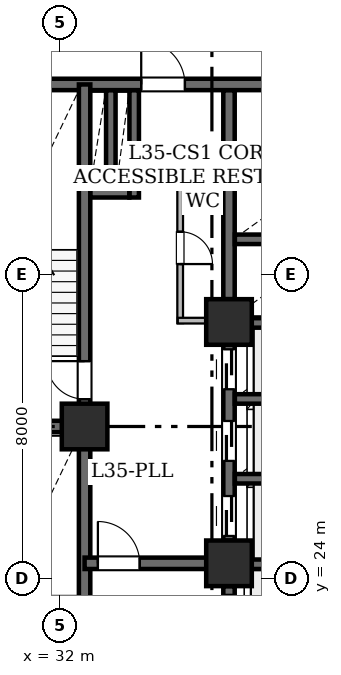
"""IFC4 building model, lengths in metres.
Left out: names, types, materials, properties, quantities, classifications, styles, units other than length and angle.
Written with IfcOpenShell. Run it as: python <this file> out.ifc"""

import sys

from ifc_helpers import new_model, si_unit, direction, frame, frame_2d, origin, origin_2d, place, context, subcontext, project, spatial, rectangle, hollow_rectangle, extrude, element, fill, save


model = new_model("IFC4")
c1 = context("Model", 3, precision=1e-05, world=origin(), true_north=direction((0.0, 1.0)))
c2 = subcontext(c1, "Body", "Model", "MODEL_VIEW")
j1 = project(units=[si_unit("LENGTHUNIT", "METRE"), si_unit("PLANEANGLEUNIT", "RADIAN")], contexts=[c1])
p1 = place(None, origin())
s1 = spatial("IfcSite", under=j1, at=p1, CompositionType="ELEMENT")
p2 = place(p1, origin())
s2 = spatial("IfcBuilding", under=s1, at=p2, CompositionType="ELEMENT")
p3 = place(p2, frame((0.0, 0.0, 138.4)))
s3 = spatial("IfcBuildingStorey", under=s2, at=p3, CompositionType="ELEMENT", Elevation=138.4)
for number, where, z_axis, x_axis in (
    (1, (32.65, 28.0, 0.0), (0.0, 0.0, 1.0), (1.0, 0.0, 0.0)),
    (2, (36.45, 24.4, 0.0), (0.0, 0.0, 1.0), (1.0, 0.0, 0.0)),
    (3, (36.45, 30.75, 0.0), (0.0, 0.0, 1.0), (1.0, 0.0, 0.0)),
):
    element("IfcColumn", number, at=place(p3, frame(where, z_axis=z_axis, x_axis=x_axis)), inside=s3, PredefinedType="COLUMN", context=c2, shape_type="SweptSolid", body=[
        extrude(hollow_rectangle(XDim=1.2, YDim=1.2, WallThickness=0.06, at=origin_2d()), origin(), (0.0, 0.0, 1.0), 3.65),
    ])
p4 = place(p3, frame((29.0, 37.0, 0.0), z_axis=(0.0, 0.0, 1.0), x_axis=(1.0, 0.0, 0.0)))
e4 = element("IfcWall", 4, at=p4, inside=s3, PredefinedType="SHEAR", context=c2, shape_type="SweptSolid", body=[
    extrude(rectangle(XDim=10.4, YDim=0.3, at=frame_2d((5.2, 0.0))), origin(), (0.0, 0.0, 1.0), 3.43),
])
p5 = place(p4, frame((5.14, 0.0, 0.0)))
e5 = element("IfcOpeningElement", 5, at=p5, cuts=e4, PredefinedType="OPENING", context=c2, shape_type="SweptSolid", body=[
    extrude(rectangle(XDim=1.15, YDim=2.2, at=frame_2d((0.575, 1.1))), frame((0.0, 0.16, 0.0), z_axis=(0.0, -1.0, 0.0), x_axis=(1.0, 0.0, 0.0)), (0.0, 0.0, 1.0), 0.32),
])
p6 = place(p3, frame((32.65, 19.0, 0.0), z_axis=(0.0, 0.0, 1.0), x_axis=(0.0, 1.0, 0.0)))
e6 = element("IfcWall", 6, at=p6, inside=s3, PredefinedType="SHEAR", context=c2, shape_type="SweptSolid", body=[
    extrude(rectangle(XDim=9.0, YDim=0.3, at=frame_2d((4.5, 0.0))), origin(), (0.0, 0.0, 1.0), 3.43),
])
p7 = place(p6, frame((0.72, 0.0, 0.0)))
e7 = element("IfcOpeningElement", 7, at=p7, cuts=e6, PredefinedType="OPENING", context=c2, shape_type="SweptSolid", body=[
    extrude(rectangle(XDim=1.0, YDim=2.15, at=frame_2d((0.5, 1.075))), frame((0.0, 0.16, 0.0), z_axis=(0.0, -1.0, 0.0), x_axis=(1.0, 0.0, 0.0)), (0.0, 0.0, 1.0), 0.32),
])
p8 = place(p3, frame((32.65, 28.0, 0.0), z_axis=(0.0, 0.0, 1.0), x_axis=(0.0, 1.0, 0.0)))
e8 = element("IfcWall", 8, at=p8, inside=s3, PredefinedType="SHEAR", context=c2, shape_type="SweptSolid", body=[
    extrude(rectangle(XDim=9.0, YDim=0.3, at=frame_2d((4.5, 0.0))), origin(), (0.0, 0.0, 1.0), 3.43),
])
p9 = place(p8, frame((0.72, 0.0, 0.0)))
e9 = element("IfcOpeningElement", 9, at=p9, cuts=e8, PredefinedType="OPENING", context=c2, shape_type="SweptSolid", body=[
    extrude(rectangle(XDim=1.0, YDim=2.15, at=frame_2d((0.5, 1.075))), frame((0.0, 0.16, 0.0), z_axis=(0.0, -1.0, 0.0), x_axis=(1.0, 0.0, 0.0)), (0.0, 0.0, 1.0), 0.32),
])
p10 = place(p3, frame((29.0, 28.0, 0.0), z_axis=(0.0, 0.0, 1.0), x_axis=(1.0, 0.0, 0.0)))
e10 = element("IfcWall", 10, at=p10, inside=s3, PredefinedType="SHEAR", context=c2, shape_type="SweptSolid", body=[
    extrude(rectangle(XDim=3.65, YDim=0.3, at=frame_2d((1.825, 0.0))), origin(), (0.0, 0.0, 1.0), 3.43),
])
p11 = place(p3, frame((32.65, 24.4, 0.0), z_axis=(0.0, 0.0, 1.0), x_axis=(1.0, 0.0, 0.0)))
e11 = element("IfcWall", 11, at=p11, inside=s3, PredefinedType="SHEAR", context=c2, shape_type="SweptSolid", body=[
    extrude(rectangle(XDim=3.8, YDim=0.3, at=frame_2d((1.9, 0.0))), origin(), (0.0, 0.0, 1.0), 3.43),
])
p12 = place(p11, frame((0.35, 0.0, 0.0)))
e12 = element("IfcOpeningElement", 12, at=p12, cuts=e11, PredefinedType="OPENING", context=c2, shape_type="SweptSolid", body=[
    extrude(rectangle(XDim=1.1, YDim=2.15, at=frame_2d((0.55, 1.075))), frame((0.0, 0.16, 0.0), z_axis=(0.0, -1.0, 0.0), x_axis=(1.0, 0.0, 0.0)), (0.0, 0.0, 1.0), 0.32),
])
p13 = place(p3, frame((36.45, 19.154, 0.0), z_axis=(0.0, 0.0, 1.0), x_axis=(0.0, 1.0, 0.0)))
e13 = element("IfcWall", 13, at=p13, inside=s3, PredefinedType="SHEAR", context=c2, shape_type="SweptSolid", body=[
    extrude(rectangle(XDim=4.646, YDim=0.3, at=frame_2d((2.323, 0.0))), origin(), (0.0, 0.0, 1.0), 3.43),
])
p14 = place(p13, frame((0.696, 0.0, 0.0)))
e14 = element("IfcOpeningElement", 14, at=p14, cuts=e13, PredefinedType="OPENING", context=c2, shape_type="SweptSolid", body=[
    extrude(rectangle(XDim=1.1, YDim=2.15, at=frame_2d((0.55, 1.075))), frame((0.0, 0.16, 0.0), z_axis=(0.0, -1.0, 0.0), x_axis=(1.0, 0.0, 0.0)), (0.0, 0.0, 1.0), 0.32),
])
p15 = place(p13, frame((3.316, 0.0, 0.0)))
e15 = element("IfcOpeningElement", 15, at=p15, cuts=e13, PredefinedType="OPENING", context=c2, shape_type="SweptSolid", body=[
    extrude(rectangle(XDim=1.1, YDim=2.15, at=frame_2d((0.55, 1.075))), frame((0.0, 0.16, 0.0), z_axis=(0.0, -1.0, 0.0), x_axis=(1.0, 0.0, 0.0)), (0.0, 0.0, 1.0), 0.32),
])
p16 = place(p3, frame((36.45, 25.0, 0.0), z_axis=(0.0, 0.0, 1.0), x_axis=(0.0, 1.0, 0.0)))
e16 = element("IfcWall", 16, at=p16, inside=s3, PredefinedType="SHEAR", context=c2, shape_type="SweptSolid", body=[
    extrude(rectangle(XDim=5.15, YDim=0.3, at=frame_2d((2.575, 0.0))), origin(), (0.0, 0.0, 1.0), 3.43),
])
p17 = place(p16, frame((0.12, 0.0, 0.0)))
e17 = element("IfcOpeningElement", 17, at=p17, cuts=e16, PredefinedType="OPENING", context=c2, shape_type="SweptSolid", body=[
    extrude(rectangle(XDim=1.05, YDim=2.15, at=frame_2d((0.525, 1.075))), frame((0.0, 0.16, 0.0), z_axis=(0.0, -1.0, 0.0), x_axis=(1.0, 0.0, 0.0)), (0.0, 0.0, 1.0), 0.32),
])
p18 = place(p16, frame((2.095, 0.0, 0.0)))
e18 = element("IfcOpeningElement", 18, at=p18, cuts=e16, PredefinedType="OPENING", context=c2, shape_type="SweptSolid", body=[
    extrude(rectangle(XDim=1.05, YDim=2.15, at=frame_2d((0.525, 1.075))), frame((0.0, 0.16, 0.0), z_axis=(0.0, -1.0, 0.0), x_axis=(1.0, 0.0, 0.0)), (0.0, 0.0, 1.0), 0.32),
])
p19 = place(p16, frame((3.98, 0.0, 0.0)))
e19 = element("IfcOpeningElement", 19, at=p19, cuts=e16, PredefinedType="OPENING", context=c2, shape_type="SweptSolid", body=[
    extrude(rectangle(XDim=1.05, YDim=2.15, at=frame_2d((0.525, 1.075))), frame((0.0, 0.16, 0.0), z_axis=(0.0, -1.0, 0.0), x_axis=(1.0, 0.0, 0.0)), (0.0, 0.0, 1.0), 0.32),
])
p20 = place(p3, frame((36.45, 31.35, 0.0), z_axis=(0.0, 0.0, 1.0), x_axis=(0.0, 1.0, 0.0)))
e20 = element("IfcWall", 20, at=p20, inside=s3, PredefinedType="SHEAR", context=c2, shape_type="SweptSolid", body=[
    extrude(rectangle(XDim=5.496, YDim=0.3, at=frame_2d((2.748, 0.0))), origin(), (0.0, 0.0, 1.0), 3.43),
])
for number, where, z_axis, x_axis in (
    (21, (36.604, 24.375, 0.0), (0.0, 0.0, 1.0), (1.0, 0.0, 0.0)),
    (22, (36.604, 26.625, 0.0), (0.0, 0.0, 1.0), (1.0, 0.0, 0.0)),
    (23, (36.604, 28.725, 0.0), (0.0, 0.0, 1.0), (1.0, 0.0, 0.0)),
    (24, (36.604, 30.725, 0.0), (0.0, 0.0, 1.0), (1.0, 0.0, 0.0)),
    (25, (36.604, 32.925, 0.0), (0.0, 0.0, 1.0), (1.0, 0.0, 0.0)),
    (26, (36.604, 34.975, 0.0), (0.0, 0.0, 1.0), (1.0, 0.0, 0.0)),
):
    element("IfcWall", number, at=place(p3, frame(where, z_axis=z_axis, x_axis=x_axis)), inside=s3, PredefinedType="SHEAR", context=c2, shape_type="SweptSolid", body=[
        extrude(rectangle(XDim=2.642, YDim=0.25, at=frame_2d((1.321, 0.0))), origin(), (0.0, 0.0, 1.0), 3.43),
    ])
p21 = place(p3, frame((33.955, 34.025, 0.0), z_axis=(0.0, 0.0, 1.0), x_axis=(0.0, 1.0, 0.0)))
e27 = element("IfcWall", 27, at=p21, inside=s3, PredefinedType="SHEAR", context=c2, shape_type="SweptSolid", body=[
    extrude(rectangle(XDim=2.821, YDim=0.25, at=frame_2d((1.411, 0.0))), origin(), (0.0, 0.0, 1.0), 3.43),
])
p22 = place(p3, frame((32.804, 34.15, 0.0), z_axis=(0.0, 0.0, 1.0), x_axis=(1.0, 0.0, 0.0)))
e28 = element("IfcWall", 28, at=p22, inside=s3, PredefinedType="SHEAR", context=c2, shape_type="SweptSolid", body=[
    extrude(rectangle(XDim=1.022, YDim=0.25, at=frame_2d((0.511, 0.0))), origin(), (0.0, 0.0, 1.0), 3.43),
])
p23 = place(p3, frame((33.34, 34.279, 0.0), z_axis=(0.0, 0.0, 1.0), x_axis=(0.0, 1.0, 0.0)))
e29 = element("IfcWall", 29, at=p23, inside=s3, PredefinedType="SHEAR", context=c2, shape_type="SweptSolid", body=[
    extrude(rectangle(XDim=2.567, YDim=0.25, at=frame_2d((1.283, 0.0))), origin(), (0.0, 0.0, 1.0), 3.43),
])
p24 = place(p3, frame((36.306, 34.615, 0.0), z_axis=(0.0, 0.0, 1.0), x_axis=(-1.0, 0.0, 0.0)))
e30 = element("IfcWall", 30, at=p24, inside=s3, PredefinedType="STANDARD", context=c2, shape_type="SweptSolid", body=[
    extrude(rectangle(XDim=1.206, YDim=0.15, at=frame_2d((0.603, 0.0))), origin(), (0.0, 0.0, 1.0), 3.43),
])
p25 = place(p3, frame((35.165, 34.678, 0.0), z_axis=(0.0, 0.0, 1.0), x_axis=(0.0, -1.0, 0.0)))
e31 = element("IfcWall", 31, at=p25, inside=s3, PredefinedType="STANDARD", context=c2, shape_type="SweptSolid", body=[
    extrude(rectangle(XDim=3.958, YDim=0.15, at=frame_2d((1.979, 0.0))), origin(), (0.0, 0.0, 1.0), 3.43),
])
p26 = place(p25, frame((1.554, 0.0, 0.0)))
e32 = element("IfcOpeningElement", 32, at=p26, cuts=e31, PredefinedType="OPENING", context=c2, shape_type="SweptSolid", body=[
    extrude(rectangle(XDim=0.85, YDim=2.1, at=frame_2d((0.425, 1.05))), frame((0.0, 0.085, 0.0), z_axis=(0.0, -1.0, 0.0), x_axis=(1.0, 0.0, 0.0)), (0.0, 0.0, 1.0), 0.17),
])
p27 = place(p3, frame((35.102, 30.785, 0.0), z_axis=(0.0, 0.0, 1.0), x_axis=(1.0, 0.0, 0.0)))
e33 = element("IfcWall", 33, at=p27, inside=s3, PredefinedType="STANDARD", context=c2, shape_type="SweptSolid", body=[
    extrude(rectangle(XDim=1.198, YDim=0.15, at=frame_2d((0.599, 0.0))), origin(), (0.0, 0.0, 1.0), 3.43),
])
p28 = place(p9, origin())
e34 = element("IfcDoor", 34, at=p28, inside=s3, OperationType="SINGLE_SWING_RIGHT", PredefinedType="DOOR", context=c2, shape_type="SweptSolid", body=[
    extrude(rectangle(XDim=1.0, YDim=2.15, at=frame_2d((0.5, 1.075))), frame((0.0, 0.025, 0.0), z_axis=(0.0, -1.0, 0.0), x_axis=(1.0, 0.0, 0.0)), (0.0, 0.0, 1.0), 0.05),
])
fill(e9, e34)
p29 = place(p12, origin())
e35 = element("IfcDoor", 35, at=p29, inside=s3, OperationType="SINGLE_SWING_LEFT", PredefinedType="DOOR", context=c2, shape_type="SweptSolid", body=[
    extrude(rectangle(XDim=1.1, YDim=2.15, at=frame_2d((0.55, 1.075))), frame((0.0, 0.025, 0.0), z_axis=(0.0, -1.0, 0.0), x_axis=(1.0, 0.0, 0.0)), (0.0, 0.0, 1.0), 0.05),
])
fill(e12, e35)
p30 = place(p5, origin())
e36 = element("IfcDoor", 36, at=p30, inside=s3, OperationType="SINGLE_SWING_LEFT", PredefinedType="DOOR", context=c2, shape_type="SweptSolid", body=[
    extrude(rectangle(XDim=1.15, YDim=2.2, at=frame_2d((0.575, 1.1))), frame((0.0, 0.025, 0.0), z_axis=(0.0, -1.0, 0.0), x_axis=(1.0, 0.0, 0.0)), (0.0, 0.0, 1.0), 0.05),
])
fill(e5, e36)
p31 = place(p15, origin())
e37 = element("IfcDoor", 37, at=p31, inside=s3, OperationType="SLIDING_TO_LEFT", PredefinedType="DOOR", context=c2, shape_type="SweptSolid", body=[
    extrude(rectangle(XDim=1.1, YDim=2.15, at=frame_2d((0.55, 1.075))), frame((0.0, 0.025, 0.0), z_axis=(0.0, -1.0, 0.0), x_axis=(1.0, 0.0, 0.0)), (0.0, 0.0, 1.0), 0.05),
])
fill(e15, e37)
p32 = place(p17, origin())
e38 = element("IfcDoor", 38, at=p32, inside=s3, OperationType="SLIDING_TO_LEFT", PredefinedType="DOOR", context=c2, shape_type="SweptSolid", body=[
    extrude(rectangle(XDim=1.05, YDim=2.15, at=frame_2d((0.525, 1.075))), frame((0.0, 0.025, 0.0), z_axis=(0.0, -1.0, 0.0), x_axis=(1.0, 0.0, 0.0)), (0.0, 0.0, 1.0), 0.05),
])
fill(e17, e38)
p33 = place(p18, origin())
e39 = element("IfcDoor", 39, at=p33, inside=s3, OperationType="SLIDING_TO_LEFT", PredefinedType="DOOR", context=c2, shape_type="SweptSolid", body=[
    extrude(rectangle(XDim=1.05, YDim=2.15, at=frame_2d((0.525, 1.075))), frame((0.0, 0.025, 0.0), z_axis=(0.0, -1.0, 0.0), x_axis=(1.0, 0.0, 0.0)), (0.0, 0.0, 1.0), 0.05),
])
fill(e18, e39)
p34 = place(p19, origin())
e40 = element("IfcDoor", 40, at=p34, inside=s3, OperationType="SLIDING_TO_LEFT", PredefinedType="DOOR", context=c2, shape_type="SweptSolid", body=[
    extrude(rectangle(XDim=1.05, YDim=2.15, at=frame_2d((0.525, 1.075))), frame((0.0, 0.025, 0.0), z_axis=(0.0, -1.0, 0.0), x_axis=(1.0, 0.0, 0.0)), (0.0, 0.0, 1.0), 0.05),
])
fill(e19, e40)
p35 = place(p26, origin())
e41 = element("IfcDoor", 41, at=p35, inside=s3, OperationType="SINGLE_SWING_RIGHT", PredefinedType="DOOR", context=c2, shape_type="SweptSolid", body=[
    extrude(rectangle(XDim=0.85, YDim=2.1, at=frame_2d((0.425, 1.05))), frame((0.0, 0.025, 0.0), z_axis=(0.0, -1.0, 0.0), x_axis=(1.0, 0.0, 0.0)), (0.0, 0.0, 1.0), 0.05),
])
fill(e32, e41)
save(model, sys.argv[1])
